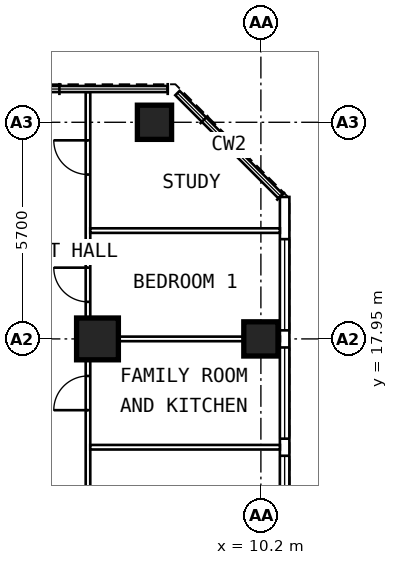
"""IFC4 building model, lengths in metres.
Left out: names, types, materials, properties, quantities, classifications, styles, units other than length and angle.
Written with IfcOpenShell. Run it as: python <this file> out.ifc"""

import sys

from ifc_helpers import new_model, si_unit, direction, frame, frame_2d, origin, origin_2d, place, context, subcontext, project, spatial, rectangle, extrude, element, fill, save


model = new_model("IFC4")
c1 = context("Model", 3, precision=1e-05, world=origin(), true_north=direction((0.0, 1.0)))
c2 = subcontext(c1, "Body", "Model", "MODEL_VIEW")
j1 = project(units=[si_unit("LENGTHUNIT", "METRE"), si_unit("PLANEANGLEUNIT", "RADIAN")], contexts=[c1])
p1 = place(None, origin())
s1 = spatial("IfcSite", under=j1, at=p1, CompositionType="ELEMENT")
p2 = place(p1, origin())
s2 = spatial("IfcBuilding", under=s1, at=p2, CompositionType="ELEMENT")
p3 = place(p2, frame((0.0, 0.0, 197.4)))
s3 = spatial("IfcBuildingStorey", under=s2, at=p3, CompositionType="ELEMENT", Elevation=197.4)
for number, where, z_axis, x_axis in (
    (1, (10.2, 17.95, 0.0), (0.0, 0.0, 1.0), (0.0, 1.0, 0.0)),
    (2, (7.4, 23.65, 0.0), (0.0, 0.0, 1.0), (0.0, 1.0, 0.0)),
):
    element("IfcColumn", number, at=place(p3, frame(where, z_axis=z_axis, x_axis=x_axis)), inside=s3, PredefinedType="COLUMN", context=c2, shape_type="SweptSolid", body=[
        extrude(rectangle(XDim=0.9, YDim=0.9, at=origin_2d()), origin(), (0.0, 0.0, 1.0), 3.6),
    ])
p4 = place(p3, frame((5.9, 17.95, 0.0), z_axis=(0.0, 0.0, 1.0), x_axis=(0.0, 1.0, 0.0)))
e3 = element("IfcColumn", 3, at=p4, inside=s3, PredefinedType="COLUMN", context=c2, shape_type="SweptSolid", body=[
    extrude(rectangle(XDim=1.1, YDim=1.1, at=origin_2d()), origin(), (0.0, 0.0, 1.0), 3.6),
])
p5 = place(p3, frame((10.825, 6.409, 0.0), z_axis=(0.0, 0.0, 1.0), x_axis=(0.0, 1.0, 0.0)))
e4 = element("IfcWall", 4, at=p5, inside=s3, PredefinedType="SOLIDWALL", context=c2, shape_type="SweptSolid", body=[
    extrude(rectangle(XDim=15.276, YDim=0.25, at=frame_2d((7.638, 0.0))), origin(), (0.0, 0.0, 1.0), 3.35),
])
p6 = place(p5, frame((0.366, 0.0, 0.8)))
e5 = element("IfcOpeningElement", 5, at=p6, cuts=e4, PredefinedType="OPENING", context=c2, shape_type="SweptSolid", body=[
    extrude(rectangle(XDim=2.4, YDim=1.8, at=frame_2d((1.2, 0.9))), frame((0.0, 0.137, 0.0), z_axis=(0.0, -1.0, 0.0), x_axis=(1.0, 0.0, 0.0)), (0.0, 0.0, 1.0), 0.274),
])
p7 = place(p5, frame((3.216, 0.0, 0.8)))
e6 = element("IfcOpeningElement", 6, at=p7, cuts=e4, PredefinedType="OPENING", context=c2, shape_type="SweptSolid", body=[
    extrude(rectangle(XDim=2.4, YDim=1.8, at=frame_2d((1.2, 0.9))), frame((0.0, 0.137, 0.0), z_axis=(0.0, -1.0, 0.0), x_axis=(1.0, 0.0, 0.0)), (0.0, 0.0, 1.0), 0.274),
])
p8 = place(p5, frame((6.066, 0.0, 0.8)))
e7 = element("IfcOpeningElement", 7, at=p8, cuts=e4, PredefinedType="OPENING", context=c2, shape_type="SweptSolid", body=[
    extrude(rectangle(XDim=2.4, YDim=1.8, at=frame_2d((1.2, 0.9))), frame((0.0, 0.137, 0.0), z_axis=(0.0, -1.0, 0.0), x_axis=(1.0, 0.0, 0.0)), (0.0, 0.0, 1.0), 0.274),
])
p9 = place(p5, frame((8.916, 0.0, 0.8)))
e8 = element("IfcOpeningElement", 8, at=p9, cuts=e4, PredefinedType="OPENING", context=c2, shape_type="SweptSolid", body=[
    extrude(rectangle(XDim=2.4, YDim=1.8, at=frame_2d((1.2, 0.9))), frame((0.0, 0.137, 0.0), z_axis=(0.0, -1.0, 0.0), x_axis=(1.0, 0.0, 0.0)), (0.0, 0.0, 1.0), 0.274),
])
p10 = place(p5, frame((11.766, 0.0, 0.8)))
e9 = element("IfcOpeningElement", 9, at=p10, cuts=e4, PredefinedType="OPENING", context=c2, shape_type="SweptSolid", body=[
    extrude(rectangle(XDim=2.4, YDim=1.8, at=frame_2d((1.2, 0.9))), frame((0.0, 0.137, 0.0), z_axis=(0.0, -1.0, 0.0), x_axis=(1.0, 0.0, 0.0)), (0.0, 0.0, 1.0), 0.274),
])
p11 = place(p3, frame((5.65, 9.6, 0.0), z_axis=(0.0, 0.0, 1.0), x_axis=(0.0, 1.0, 0.0)))
e10 = element("IfcWall", 10, at=p11, inside=s3, PredefinedType="PARTITIONING", context=c2, shape_type="SweptSolid", body=[
    extrude(rectangle(XDim=14.845, YDim=0.12, at=frame_2d((7.422, 0.0))), origin(), (0.0, 0.0, 1.0), 3.35),
])
p12 = place(p11, frame((3.35, 0.0, 0.0)))
e11 = element("IfcOpeningElement", 11, at=p12, cuts=e10, PredefinedType="OPENING", context=c2, shape_type="SweptSolid", body=[
    extrude(rectangle(XDim=0.9, YDim=2.1, at=frame_2d((0.45, 1.05))), frame((0.0, 0.072, 0.0), z_axis=(0.0, -1.0, 0.0), x_axis=(1.0, 0.0, 0.0)), (0.0, 0.0, 1.0), 0.144),
])
p13 = place(p11, frame((6.475, 0.0, 0.0)))
e12 = element("IfcOpeningElement", 12, at=p13, cuts=e10, PredefinedType="OPENING", context=c2, shape_type="SweptSolid", body=[
    extrude(rectangle(XDim=0.9, YDim=2.1, at=frame_2d((0.45, 1.05))), frame((0.0, 0.072, 0.0), z_axis=(0.0, -1.0, 0.0), x_axis=(1.0, 0.0, 0.0)), (0.0, 0.0, 1.0), 0.144),
])
p14 = place(p11, frame((9.325, 0.0, 0.0)))
e13 = element("IfcOpeningElement", 13, at=p14, cuts=e10, PredefinedType="OPENING", context=c2, shape_type="SweptSolid", body=[
    extrude(rectangle(XDim=0.9, YDim=2.1, at=frame_2d((0.45, 1.05))), frame((0.0, 0.072, 0.0), z_axis=(0.0, -1.0, 0.0), x_axis=(1.0, 0.0, 0.0)), (0.0, 0.0, 1.0), 0.144),
])
p15 = place(p11, frame((12.675, 0.0, 0.0)))
e14 = element("IfcOpeningElement", 14, at=p15, cuts=e10, PredefinedType="OPENING", context=c2, shape_type="SweptSolid", body=[
    extrude(rectangle(XDim=0.9, YDim=2.1, at=frame_2d((0.45, 1.05))), frame((0.0, 0.072, 0.0), z_axis=(0.0, -1.0, 0.0), x_axis=(1.0, 0.0, 0.0)), (0.0, 0.0, 1.0), 0.144),
])
p16 = place(p3, frame((5.71, 15.1, 0.0), z_axis=(0.0, 0.0, 1.0), x_axis=(1.0, 0.0, 0.0)))
e15 = element("IfcWall", 15, at=p16, inside=s3, PredefinedType="PARTITIONING", context=c2, shape_type="SweptSolid", body=[
    extrude(rectangle(XDim=4.99, YDim=0.12, at=frame_2d((2.495, 0.0))), origin(), (0.0, 0.0, 1.0), 3.35),
])
p17 = place(p3, frame((5.71, 17.95, 0.0), z_axis=(0.0, 0.0, 1.0), x_axis=(1.0, 0.0, 0.0)))
e16 = element("IfcWall", 16, at=p17, inside=s3, PredefinedType="PARTITIONING", context=c2, shape_type="SweptSolid", body=[
    extrude(rectangle(XDim=4.99, YDim=0.12, at=frame_2d((2.495, 0.0))), origin(), (0.0, 0.0, 1.0), 2.45),
])
p18 = place(p3, frame((5.71, 20.8, 0.0), z_axis=(0.0, 0.0, 1.0), x_axis=(1.0, 0.0, 0.0)))
e17 = element("IfcWall", 17, at=p18, inside=s3, PredefinedType="PARTITIONING", context=c2, shape_type="SweptSolid", body=[
    extrude(rectangle(XDim=4.99, YDim=0.12, at=frame_2d((2.495, 0.0))), origin(), (0.0, 0.0, 1.0), 3.35),
])
p19 = place(p8, origin())
e18 = element("IfcWindow", 18, at=p19, inside=s3, PartitioningType="SINGLE_PANEL", PredefinedType="WINDOW", context=c2, shape_type="SweptSolid", body=[
    extrude(rectangle(XDim=2.4, YDim=1.8, at=frame_2d((1.2, 0.9))), frame((0.0, 0.03, 0.0), z_axis=(0.0, -1.0, 0.0), x_axis=(1.0, 0.0, 0.0)), (0.0, 0.0, 1.0), 0.06),
])
fill(e7, e18)
p20 = place(p9, origin())
e19 = element("IfcWindow", 19, at=p20, inside=s3, PartitioningType="SINGLE_PANEL", PredefinedType="WINDOW", context=c2, shape_type="SweptSolid", body=[
    extrude(rectangle(XDim=2.4, YDim=1.8, at=frame_2d((1.2, 0.9))), frame((0.0, 0.03, 0.0), z_axis=(0.0, -1.0, 0.0), x_axis=(1.0, 0.0, 0.0)), (0.0, 0.0, 1.0), 0.06),
])
fill(e8, e19)
p21 = place(p10, origin())
e20 = element("IfcWindow", 20, at=p21, inside=s3, PartitioningType="SINGLE_PANEL", PredefinedType="WINDOW", context=c2, shape_type="SweptSolid", body=[
    extrude(rectangle(XDim=2.4, YDim=1.8, at=frame_2d((1.2, 0.9))), frame((0.0, 0.03, 0.0), z_axis=(0.0, -1.0, 0.0), x_axis=(1.0, 0.0, 0.0)), (0.0, 0.0, 1.0), 0.06),
])
fill(e9, e20)
p22 = place(p13, origin())
e21 = element("IfcDoor", 21, at=p22, inside=s3, OperationType="SINGLE_SWING_LEFT", PredefinedType="DOOR", context=c2, shape_type="SweptSolid", body=[
    extrude(rectangle(XDim=0.9, YDim=2.1, at=frame_2d((0.45, 1.05))), frame((0.0, 0.025, 0.0), z_axis=(0.0, -1.0, 0.0), x_axis=(1.0, 0.0, 0.0)), (0.0, 0.0, 1.0), 0.05),
])
fill(e12, e21)
p23 = place(p14, origin())
e22 = element("IfcDoor", 22, at=p23, inside=s3, OperationType="SINGLE_SWING_RIGHT", PredefinedType="DOOR", context=c2, shape_type="SweptSolid", body=[
    extrude(rectangle(XDim=0.9, YDim=2.1, at=frame_2d((0.45, 1.05))), frame((0.0, 0.025, 0.0), z_axis=(0.0, -1.0, 0.0), x_axis=(1.0, 0.0, 0.0)), (0.0, 0.0, 1.0), 0.05),
])
fill(e13, e22)
p24 = place(p15, origin())
e23 = element("IfcDoor", 23, at=p24, inside=s3, OperationType="SINGLE_SWING_RIGHT", PredefinedType="DOOR", context=c2, shape_type="SweptSolid", body=[
    extrude(rectangle(XDim=0.9, YDim=2.1, at=frame_2d((0.45, 1.05))), frame((0.0, 0.025, 0.0), z_axis=(0.0, -1.0, 0.0), x_axis=(1.0, 0.0, 0.0)), (0.0, 0.0, 1.0), 0.05),
])
fill(e14, e23)
save(model, sys.argv[1])
